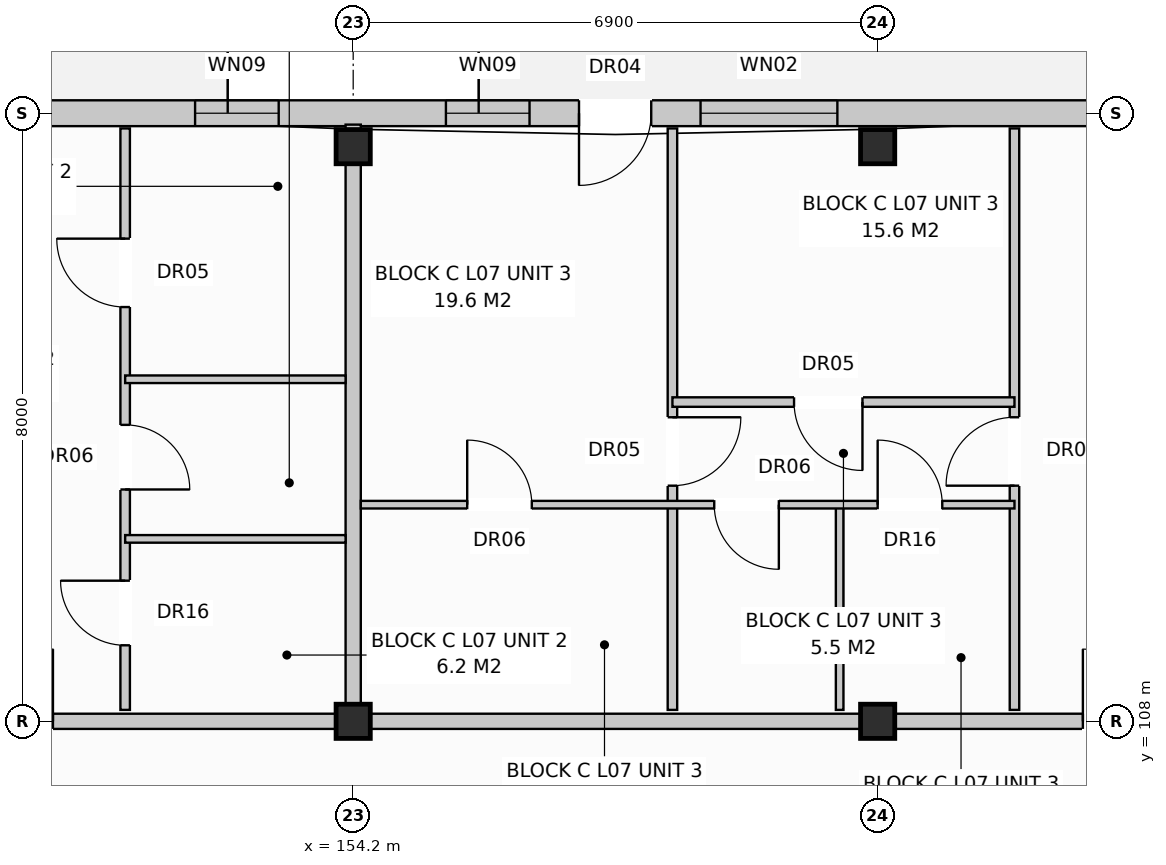
"""IFC4 building model, lengths in metres.
Left out: names, types, materials, properties, quantities, classifications, styles, units other than length and angle.
Written with IfcOpenShell. Run it as: python <this file> out.ifc"""

import sys

from ifc_helpers import new_model, si_unit, direction, frame, frame_2d, origin, origin_with_axes, origin_2d, place, context, subcontext, project, spatial, rectangle, extrude, element, fill, save


model = new_model("IFC4")
c1 = context("Model", 3, precision=1e-05, world=origin(), true_north=direction((0.0, 1.0)))
c2 = subcontext(c1, "Body", "Model", "MODEL_VIEW")
j1 = project(units=[si_unit("LENGTHUNIT", "METRE"), si_unit("PLANEANGLEUNIT", "RADIAN")], contexts=[c1])
p1 = place(None, origin())
s1 = spatial("IfcSite", under=j1, at=p1, CompositionType="ELEMENT")
p2 = place(p1, origin())
s2 = spatial("IfcBuilding", under=s1, at=p2, CompositionType="ELEMENT")
p3 = place(p2, frame((0.0, 0.0, 24.0)))
s3 = spatial("IfcBuildingStorey", under=s2, at=p3, CompositionType="ELEMENT", Elevation=24.0)
for number, where, z_axis, x_axis in (
    (1, (154.2, 108.0, 0.0), (0.0, 0.0, 1.0), (1.0, 0.0, 0.0)),
    (2, (154.2, 115.56, 0.0), (0.0, 0.0, 1.0), (1.0, 0.0, 0.0)),
    (3, (161.1, 108.0, 0.0), (0.0, 0.0, 1.0), (1.0, 0.0, 0.0)),
    (4, (161.1, 115.56, 0.0), (0.0, 0.0, 1.0), (1.0, 0.0, 0.0)),
):
    element("IfcColumn", number, at=place(p3, frame(where, z_axis=z_axis, x_axis=x_axis)), inside=s3, PredefinedType="COLUMN", context=c2, shape_type="SweptSolid", body=[
        extrude(rectangle(XDim=0.45, YDim=0.45, at=origin_2d()), origin(), (0.0, 0.0, 1.0), 3.2),
    ])
p4 = place(p3, frame((126.76, 116.0, 0.0), z_axis=(0.0, 0.0, 1.0), x_axis=(1.0, 0.0, 0.0)))
e5 = element("IfcWall", 5, at=p4, inside=s3, PredefinedType="STANDARD", context=c2, shape_type="SweptSolid", body=[
    extrude(rectangle(XDim=41.08, YDim=0.34, at=frame_2d((20.54, 0.0))), origin(), (0.0, 0.0, 1.0), 2.95),
])
p5 = place(p4, frame((4.911, 0.0, 0.0)))
e6 = element("IfcOpeningElement", 6, at=p5, cuts=e5, PredefinedType="OPENING", context=c2, shape_type="SweptSolid", body=[
    extrude(rectangle(XDim=0.95, YDim=2.1, at=frame_2d((0.475, 1.05))), frame((0.0, 0.182, 0.0), z_axis=(0.0, -1.0, 0.0), x_axis=(1.0, 0.0, 0.0)), (0.0, 0.0, 1.0), 0.364),
])
p6 = place(p4, frame((18.91, 0.0, 0.0)))
e7 = element("IfcOpeningElement", 7, at=p6, cuts=e5, PredefinedType="OPENING", context=c2, shape_type="SweptSolid", body=[
    extrude(rectangle(XDim=0.95, YDim=2.1, at=frame_2d((0.475, 1.05))), frame((0.0, 0.182, 0.0), z_axis=(0.0, -1.0, 0.0), x_axis=(1.0, 0.0, 0.0)), (0.0, 0.0, 1.0), 0.364),
])
p7 = place(p4, frame((30.411, 0.0, 0.0)))
e8 = element("IfcOpeningElement", 8, at=p7, cuts=e5, PredefinedType="OPENING", context=c2, shape_type="SweptSolid", body=[
    extrude(rectangle(XDim=0.95, YDim=2.1, at=frame_2d((0.475, 1.05))), frame((0.0, 0.182, 0.0), z_axis=(0.0, -1.0, 0.0), x_axis=(1.0, 0.0, 0.0)), (0.0, 0.0, 1.0), 0.364),
])
p8 = place(p4, frame((2.46, 0.0, 0.72)))
e9 = element("IfcOpeningElement", 9, at=p8, cuts=e5, PredefinedType="OPENING", context=c2, shape_type="SweptSolid", body=[
    extrude(rectangle(XDim=1.1, YDim=1.5, at=frame_2d((0.55, 0.75))), frame((0.0, 0.182, 0.0), z_axis=(0.0, -1.0, 0.0), x_axis=(1.0, 0.0, 0.0)), (0.0, 0.0, 1.0), 0.364),
])
p9 = place(p4, frame((7.81, 0.0, 0.8)))
e10 = element("IfcOpeningElement", 10, at=p9, cuts=e5, PredefinedType="OPENING", context=c2, shape_type="SweptSolid", body=[
    extrude(rectangle(XDim=1.8, YDim=1.7, at=frame_2d((0.9, 0.85))), frame((0.0, 0.182, 0.0), z_axis=(0.0, -1.0, 0.0), x_axis=(1.0, 0.0, 0.0)), (0.0, 0.0, 1.0), 0.364),
])
p10 = place(p4, frame((14.56, 0.0, 0.72)))
e11 = element("IfcOpeningElement", 11, at=p10, cuts=e5, PredefinedType="OPENING", context=c2, shape_type="SweptSolid", body=[
    extrude(rectangle(XDim=1.1, YDim=1.5, at=frame_2d((0.55, 0.75))), frame((0.0, 0.182, 0.0), z_axis=(0.0, -1.0, 0.0), x_axis=(1.0, 0.0, 0.0)), (0.0, 0.0, 1.0), 0.364),
])
p11 = place(p4, frame((16.76, 0.0, 0.8)))
e12 = element("IfcOpeningElement", 12, at=p11, cuts=e5, PredefinedType="OPENING", context=c2, shape_type="SweptSolid", body=[
    extrude(rectangle(XDim=1.9, YDim=1.85, at=frame_2d((0.95, 0.925))), frame((0.0, 0.182, 0.0), z_axis=(0.0, -1.0, 0.0), x_axis=(1.0, 0.0, 0.0)), (0.0, 0.0, 1.0), 0.364),
])
p12 = place(p4, frame((21.61, 0.0, 0.8)))
e13 = element("IfcOpeningElement", 13, at=p12, cuts=e5, PredefinedType="OPENING", context=c2, shape_type="SweptSolid", body=[
    extrude(rectangle(XDim=1.8, YDim=1.7, at=frame_2d((0.9, 0.85))), frame((0.0, 0.182, 0.0), z_axis=(0.0, -1.0, 0.0), x_axis=(1.0, 0.0, 0.0)), (0.0, 0.0, 1.0), 0.364),
])
p13 = place(p4, frame((25.36, 0.0, 0.72)))
e14 = element("IfcOpeningElement", 14, at=p13, cuts=e5, PredefinedType="OPENING", context=c2, shape_type="SweptSolid", body=[
    extrude(rectangle(XDim=1.1, YDim=1.5, at=frame_2d((0.55, 0.75))), frame((0.0, 0.182, 0.0), z_axis=(0.0, -1.0, 0.0), x_axis=(1.0, 0.0, 0.0)), (0.0, 0.0, 1.0), 0.364),
])
p14 = place(p4, frame((28.66, 0.0, 0.72)))
e15 = element("IfcOpeningElement", 15, at=p14, cuts=e5, PredefinedType="OPENING", context=c2, shape_type="SweptSolid", body=[
    extrude(rectangle(XDim=1.1, YDim=1.5, at=frame_2d((0.55, 0.75))), frame((0.0, 0.182, 0.0), z_axis=(0.0, -1.0, 0.0), x_axis=(1.0, 0.0, 0.0)), (0.0, 0.0, 1.0), 0.364),
])
p15 = place(p4, frame((32.01, 0.0, 0.8)))
e16 = element("IfcOpeningElement", 16, at=p15, cuts=e5, PredefinedType="OPENING", context=c2, shape_type="SweptSolid", body=[
    extrude(rectangle(XDim=1.8, YDim=1.7, at=frame_2d((0.9, 0.85))), frame((0.0, 0.182, 0.0), z_axis=(0.0, -1.0, 0.0), x_axis=(1.0, 0.0, 0.0)), (0.0, 0.0, 1.0), 0.364),
])
p16 = place(p4, frame((38.06, 0.0, 0.72)))
e17 = element("IfcOpeningElement", 17, at=p16, cuts=e5, PredefinedType="OPENING", context=c2, shape_type="SweptSolid", body=[
    extrude(rectangle(XDim=1.1, YDim=1.5, at=frame_2d((0.55, 0.75))), frame((0.0, 0.182, 0.0), z_axis=(0.0, -1.0, 0.0), x_axis=(1.0, 0.0, 0.0)), (0.0, 0.0, 1.0), 0.364),
])
p17 = place(p3, frame((154.2, 108.15, 0.0), z_axis=(0.0, 0.0, 1.0), x_axis=(0.0, 1.0, 0.0)))
e18 = element("IfcWall", 18, at=p17, inside=s3, PredefinedType="PARTITIONING", context=c2, shape_type="SweptSolid", body=[
    extrude(rectangle(XDim=7.7, YDim=0.2, at=frame_2d((3.85, 0.0))), origin(), (0.0, 0.0, 1.0), 2.95),
])
p18 = place(p3, frame((147.3, 108.0, 0.0), z_axis=(0.0, 0.0, 1.0), x_axis=(1.0, 0.0, 0.0)))
e19 = element("IfcWall", 19, at=p18, inside=s3, PredefinedType="PARTITIONING", context=c2, shape_type="SweptSolid", body=[
    extrude(rectangle(XDim=6.9, YDim=0.2, at=frame_2d((3.45, 0.0))), origin(), (0.0, 0.0, 1.0), 2.39),
])
p19 = place(p18, frame((2.0, 0.0, 0.0)))
e20 = element("IfcOpeningElement", 20, at=p19, cuts=e19, PredefinedType="OPENING", context=c2, shape_type="SweptSolid", body=[
    extrude(rectangle(XDim=0.95, YDim=2.15, at=frame_2d((0.475, 1.075))), frame((0.0, 0.112, 0.0), z_axis=(0.0, -1.0, 0.0), x_axis=(1.0, 0.0, 0.0)), (0.0, 0.0, 1.0), 0.224),
])
p20 = place(p3, frame((151.2, 108.15, 0.0), z_axis=(0.0, 0.0, 1.0), x_axis=(0.0, 1.0, 0.0)))
e21 = element("IfcWall", 21, at=p20, inside=s3, PredefinedType="PARTITIONING", context=c2, shape_type="SweptSolid", body=[
    extrude(rectangle(XDim=7.65, YDim=0.125, at=frame_2d((3.825, 0.0))), origin(), (0.0, 0.0, 1.0), 2.95),
])
p21 = place(p20, frame((0.85, 0.0, 0.0)))
e22 = element("IfcOpeningElement", 22, at=p21, cuts=e21, PredefinedType="OPENING", context=c2, shape_type="SweptSolid", body=[
    extrude(rectangle(XDim=0.85, YDim=2.1, at=frame_2d((0.425, 1.05))), frame((0.0, 0.074, 0.0), z_axis=(0.0, -1.0, 0.0), x_axis=(1.0, 0.0, 0.0)), (0.0, 0.0, 1.0), 0.149),
])
p22 = place(p20, frame((2.9, 0.0, 0.0)))
e23 = element("IfcOpeningElement", 23, at=p22, cuts=e21, PredefinedType="OPENING", context=c2, shape_type="SweptSolid", body=[
    extrude(rectangle(XDim=0.85, YDim=2.05, at=frame_2d((0.425, 1.025))), frame((0.0, 0.074, 0.0), z_axis=(0.0, -1.0, 0.0), x_axis=(1.0, 0.0, 0.0)), (0.0, 0.0, 1.0), 0.149),
])
p23 = place(p20, frame((5.3, 0.0, 0.0)))
e24 = element("IfcOpeningElement", 24, at=p23, cuts=e21, PredefinedType="OPENING", context=c2, shape_type="SweptSolid", body=[
    extrude(rectangle(XDim=0.9, YDim=2.1, at=frame_2d((0.45, 1.05))), frame((0.0, 0.074, 0.0), z_axis=(0.0, -1.0, 0.0), x_axis=(1.0, 0.0, 0.0)), (0.0, 0.0, 1.0), 0.149),
])
for number, where, z_axis, x_axis in (
    (25, (151.2, 110.4, 0.0), (0.0, 0.0, 1.0), (1.0, 0.0, 0.0)),
    (26, (151.2, 112.5, 0.0), (0.0, 0.0, 1.0), (1.0, 0.0, 0.0)),
):
    element("IfcWall", number, at=place(p3, frame(where, z_axis=z_axis, x_axis=x_axis)), inside=s3, PredefinedType="PARTITIONING", context=c2, shape_type="SweptSolid", body=[
        extrude(rectangle(XDim=2.9, YDim=0.1, at=frame_2d((1.45, 0.0))), origin(), (0.0, 0.0, 1.0), 2.95),
    ])
p24 = place(p3, frame((154.2, 108.0, 0.0), z_axis=(0.0, 0.0, 1.0), x_axis=(1.0, 0.0, 0.0)))
e27 = element("IfcWall", 27, at=p24, inside=s3, PredefinedType="PARTITIONING", context=c2, shape_type="SweptSolid", body=[
    extrude(rectangle(XDim=13.8, YDim=0.2, at=frame_2d((6.9, 0.0))), origin(), (0.0, 0.0, 1.0), 2.39),
])
p25 = place(p24, frame((9.6, 0.0, 0.0)))
e28 = element("IfcOpeningElement", 28, at=p25, cuts=e27, PredefinedType="OPENING", context=c2, shape_type="SweptSolid", body=[
    extrude(rectangle(XDim=0.95, YDim=2.15, at=frame_2d((0.475, 1.075))), frame((0.0, 0.112, 0.0), z_axis=(0.0, -1.0, 0.0), x_axis=(1.0, 0.0, 0.0)), (0.0, 0.0, 1.0), 0.224),
])
p26 = place(p3, frame((162.9, 108.15, 0.0), z_axis=(0.0, 0.0, 1.0), x_axis=(0.0, 1.0, 0.0)))
e29 = element("IfcWall", 29, at=p26, inside=s3, PredefinedType="PARTITIONING", context=c2, shape_type="SweptSolid", body=[
    extrude(rectangle(XDim=7.65, YDim=0.125, at=frame_2d((3.825, 0.0))), origin(), (0.0, 0.0, 1.0), 2.95),
])
p27 = place(p26, frame((2.95, 0.0, 0.0)))
e30 = element("IfcOpeningElement", 30, at=p27, cuts=e29, PredefinedType="OPENING", context=c2, shape_type="SweptSolid", body=[
    extrude(rectangle(XDim=0.9, YDim=2.1, at=frame_2d((0.45, 1.05))), frame((0.0, 0.074, 0.0), z_axis=(0.0, -1.0, 0.0), x_axis=(1.0, 0.0, 0.0)), (0.0, 0.0, 1.0), 0.149),
])
p28 = place(p3, frame((158.4, 108.15, 0.0), z_axis=(0.0, 0.0, 1.0), x_axis=(0.0, 1.0, 0.0)))
e31 = element("IfcWall", 31, at=p28, inside=s3, PredefinedType="PARTITIONING", context=c2, shape_type="SweptSolid", body=[
    extrude(rectangle(XDim=7.65, YDim=0.125, at=frame_2d((3.825, 0.0))), origin(), (0.0, 0.0, 1.0), 2.95),
])
p29 = place(p28, frame((2.95, 0.0, 0.0)))
e32 = element("IfcOpeningElement", 32, at=p29, cuts=e31, PredefinedType="OPENING", context=c2, shape_type="SweptSolid", body=[
    extrude(rectangle(XDim=0.9, YDim=2.1, at=frame_2d((0.45, 1.05))), frame((0.0, 0.074, 0.0), z_axis=(0.0, -1.0, 0.0), x_axis=(1.0, 0.0, 0.0)), (0.0, 0.0, 1.0), 0.149),
])
p30 = place(p3, frame((160.6, 108.15, 0.0), z_axis=(0.0, 0.0, 1.0), x_axis=(0.0, 1.0, 0.0)))
e33 = element("IfcWall", 33, at=p30, inside=s3, PredefinedType="PARTITIONING", context=c2, shape_type="SweptSolid", body=[
    extrude(rectangle(XDim=2.7, YDim=0.1, at=frame_2d((1.35, 0.0))), origin(), (0.0, 0.0, 1.0), 2.95),
])
p31 = place(p3, frame((154.3, 110.85, 0.0), z_axis=(0.0, 0.0, 1.0), x_axis=(1.0, 0.0, 0.0)))
e34 = element("IfcWall", 34, at=p31, inside=s3, PredefinedType="PARTITIONING", context=c2, shape_type="SweptSolid", body=[
    extrude(rectangle(XDim=8.6, YDim=0.1, at=frame_2d((4.3, 0.0))), origin(), (0.0, 0.0, 1.0), 2.95),
])
p32 = place(p31, frame((1.4, 0.0, 0.0)))
e35 = element("IfcOpeningElement", 35, at=p32, cuts=e34, PredefinedType="OPENING", context=c2, shape_type="SweptSolid", body=[
    extrude(rectangle(XDim=0.85, YDim=2.05, at=frame_2d((0.425, 1.025))), frame((0.0, 0.062, 0.0), z_axis=(0.0, -1.0, 0.0), x_axis=(1.0, 0.0, 0.0)), (0.0, 0.0, 1.0), 0.124),
])
p33 = place(p31, frame((4.65, 0.0, 0.0)))
e36 = element("IfcOpeningElement", 36, at=p33, cuts=e34, PredefinedType="OPENING", context=c2, shape_type="SweptSolid", body=[
    extrude(rectangle(XDim=0.85, YDim=2.05, at=frame_2d((0.425, 1.025))), frame((0.0, 0.062, 0.0), z_axis=(0.0, -1.0, 0.0), x_axis=(1.0, 0.0, 0.0)), (0.0, 0.0, 1.0), 0.124),
])
p34 = place(p31, frame((6.8, 0.0, 0.0)))
e37 = element("IfcOpeningElement", 37, at=p34, cuts=e34, PredefinedType="OPENING", context=c2, shape_type="SweptSolid", body=[
    extrude(rectangle(XDim=0.85, YDim=2.1, at=frame_2d((0.425, 1.05))), frame((0.0, 0.062, 0.0), z_axis=(0.0, -1.0, 0.0), x_axis=(1.0, 0.0, 0.0)), (0.0, 0.0, 1.0), 0.124),
])
p35 = place(p3, frame((158.4, 112.2, 0.0), z_axis=(0.0, 0.0, 1.0), x_axis=(1.0, 0.0, 0.0)))
e38 = element("IfcWall", 38, at=p35, inside=s3, PredefinedType="PARTITIONING", context=c2, shape_type="SweptSolid", body=[
    extrude(rectangle(XDim=4.5, YDim=0.125, at=frame_2d((2.25, 0.0))), origin(), (0.0, 0.0, 1.0), 2.95),
])
p36 = place(p35, frame((1.6, 0.0, 0.0)))
e39 = element("IfcOpeningElement", 39, at=p36, cuts=e38, PredefinedType="OPENING", context=c2, shape_type="SweptSolid", body=[
    extrude(rectangle(XDim=0.9, YDim=2.1, at=frame_2d((0.45, 1.05))), frame((0.0, 0.074, 0.0), z_axis=(0.0, -1.0, 0.0), x_axis=(1.0, 0.0, 0.0)), (0.0, 0.0, 1.0), 0.149),
])
p37 = place(p7, frame((0.95, 0.0, 0.0), z_axis=(0.0, 0.0, 1.0), x_axis=(-1.0, 0.0, 0.0)))
e40 = element("IfcDoor", 40, at=p37, inside=s3, OperationType="SINGLE_SWING_LEFT", PredefinedType="DOOR", context=c2, shape_type="SweptSolid", body=[
    extrude(rectangle(XDim=0.95, YDim=2.1, at=frame_2d((0.475, 1.05))), frame((0.0, 0.025, 0.0), z_axis=(0.0, -1.0, 0.0), x_axis=(1.0, 0.0, 0.0)), (0.0, 0.0, 1.0), 0.05),
])
fill(e8, e40)
p38 = place(p13, origin_with_axes())
e41 = element("IfcWindow", 41, at=p38, inside=s3, PartitioningType="SINGLE_PANEL", PredefinedType="WINDOW", context=c2, shape_type="SweptSolid", body=[
    extrude(rectangle(XDim=1.1, YDim=1.5, at=frame_2d((0.55, 0.75))), frame((0.0, 0.03, 0.0), z_axis=(0.0, -1.0, 0.0), x_axis=(1.0, 0.0, 0.0)), (0.0, 0.0, 1.0), 0.06),
])
fill(e14, e41)
p39 = place(p14, origin_with_axes())
e42 = element("IfcWindow", 42, at=p39, inside=s3, PartitioningType="SINGLE_PANEL", PredefinedType="WINDOW", context=c2, shape_type="SweptSolid", body=[
    extrude(rectangle(XDim=1.1, YDim=1.5, at=frame_2d((0.55, 0.75))), frame((0.0, 0.03, 0.0), z_axis=(0.0, -1.0, 0.0), x_axis=(1.0, 0.0, 0.0)), (0.0, 0.0, 1.0), 0.06),
])
fill(e15, e42)
p40 = place(p15, origin_with_axes())
e43 = element("IfcWindow", 43, at=p40, inside=s3, PartitioningType="SINGLE_PANEL", PredefinedType="WINDOW", context=c2, shape_type="SweptSolid", body=[
    extrude(rectangle(XDim=1.8, YDim=1.7, at=frame_2d((0.9, 0.85))), frame((0.0, 0.03, 0.0), z_axis=(0.0, -1.0, 0.0), x_axis=(1.0, 0.0, 0.0)), (0.0, 0.0, 1.0), 0.06),
])
fill(e16, e43)
p41 = place(p19, origin_with_axes())
e44 = element("IfcDoor", 44, at=p41, inside=s3, OperationType="SINGLE_SWING_RIGHT", PredefinedType="DOOR", context=c2, shape_type="SweptSolid", body=[
    extrude(rectangle(XDim=0.95, YDim=2.15, at=frame_2d((0.475, 1.075))), frame((0.0, 0.025, 0.0), z_axis=(0.0, -1.0, 0.0), x_axis=(1.0, 0.0, 0.0)), (0.0, 0.0, 1.0), 0.05),
])
fill(e20, e44)
p42 = place(p21, origin_with_axes())
e45 = element("IfcDoor", 45, at=p42, inside=s3, OperationType="SINGLE_SWING_RIGHT", PredefinedType="DOOR", context=c2, shape_type="SweptSolid", body=[
    extrude(rectangle(XDim=0.85, YDim=2.1, at=frame_2d((0.425, 1.05))), frame((0.0, 0.025, 0.0), z_axis=(0.0, -1.0, 0.0), x_axis=(1.0, 0.0, 0.0)), (0.0, 0.0, 1.0), 0.05),
])
fill(e22, e45)
p43 = place(p22, frame((0.85, 0.0, 0.0), z_axis=(0.0, 0.0, 1.0), x_axis=(-1.0, 0.0, 0.0)))
e46 = element("IfcDoor", 46, at=p43, inside=s3, OperationType="SINGLE_SWING_LEFT", PredefinedType="DOOR", context=c2, shape_type="SweptSolid", body=[
    extrude(rectangle(XDim=0.85, YDim=2.05, at=frame_2d((0.425, 1.025))), frame((0.0, 0.025, 0.0), z_axis=(0.0, -1.0, 0.0), x_axis=(1.0, 0.0, 0.0)), (0.0, 0.0, 1.0), 0.05),
])
fill(e23, e46)
p44 = place(p23, origin_with_axes())
e47 = element("IfcDoor", 47, at=p44, inside=s3, OperationType="SINGLE_SWING_RIGHT", PredefinedType="DOOR", context=c2, shape_type="SweptSolid", body=[
    extrude(rectangle(XDim=0.9, YDim=2.1, at=frame_2d((0.45, 1.05))), frame((0.0, 0.025, 0.0), z_axis=(0.0, -1.0, 0.0), x_axis=(1.0, 0.0, 0.0)), (0.0, 0.0, 1.0), 0.05),
])
fill(e24, e47)
p45 = place(p25, origin_with_axes())
e48 = element("IfcDoor", 48, at=p45, inside=s3, OperationType="SINGLE_SWING_LEFT", PredefinedType="DOOR", context=c2, shape_type="SweptSolid", body=[
    extrude(rectangle(XDim=0.95, YDim=2.15, at=frame_2d((0.475, 1.075))), frame((0.0, 0.025, 0.0), z_axis=(0.0, -1.0, 0.0), x_axis=(1.0, 0.0, 0.0)), (0.0, 0.0, 1.0), 0.05),
])
fill(e28, e48)
p46 = place(p27, origin_with_axes())
e49 = element("IfcDoor", 49, at=p46, inside=s3, OperationType="SINGLE_SWING_LEFT", PredefinedType="DOOR", context=c2, shape_type="SweptSolid", body=[
    extrude(rectangle(XDim=0.9, YDim=2.1, at=frame_2d((0.45, 1.05))), frame((0.0, 0.025, 0.0), z_axis=(0.0, -1.0, 0.0), x_axis=(1.0, 0.0, 0.0)), (0.0, 0.0, 1.0), 0.05),
])
fill(e30, e49)
p47 = place(p29, frame((0.9, 0.0, 0.0), z_axis=(0.0, 0.0, 1.0), x_axis=(-1.0, 0.0, 0.0)))
e50 = element("IfcDoor", 50, at=p47, inside=s3, OperationType="SINGLE_SWING_RIGHT", PredefinedType="DOOR", context=c2, shape_type="SweptSolid", body=[
    extrude(rectangle(XDim=0.9, YDim=2.1, at=frame_2d((0.45, 1.05))), frame((0.0, 0.025, 0.0), z_axis=(0.0, -1.0, 0.0), x_axis=(1.0, 0.0, 0.0)), (0.0, 0.0, 1.0), 0.05),
])
fill(e32, e50)
p48 = place(p32, origin_with_axes())
e51 = element("IfcDoor", 51, at=p48, inside=s3, OperationType="SINGLE_SWING_LEFT", PredefinedType="DOOR", context=c2, shape_type="SweptSolid", body=[
    extrude(rectangle(XDim=0.85, YDim=2.05, at=frame_2d((0.425, 1.025))), frame((0.0, 0.025, 0.0), z_axis=(0.0, -1.0, 0.0), x_axis=(1.0, 0.0, 0.0)), (0.0, 0.0, 1.0), 0.05),
])
fill(e35, e51)
p49 = place(p33, frame((0.85, 0.0, 0.0), z_axis=(0.0, 0.0, 1.0), x_axis=(-1.0, 0.0, 0.0)))
e52 = element("IfcDoor", 52, at=p49, inside=s3, OperationType="SINGLE_SWING_RIGHT", PredefinedType="DOOR", context=c2, shape_type="SweptSolid", body=[
    extrude(rectangle(XDim=0.85, YDim=2.05, at=frame_2d((0.425, 1.025))), frame((0.0, 0.025, 0.0), z_axis=(0.0, -1.0, 0.0), x_axis=(1.0, 0.0, 0.0)), (0.0, 0.0, 1.0), 0.05),
])
fill(e36, e52)
p50 = place(p34, origin_with_axes())
e53 = element("IfcDoor", 53, at=p50, inside=s3, OperationType="SINGLE_SWING_LEFT", PredefinedType="DOOR", context=c2, shape_type="SweptSolid", body=[
    extrude(rectangle(XDim=0.85, YDim=2.1, at=frame_2d((0.425, 1.05))), frame((0.0, 0.025, 0.0), z_axis=(0.0, -1.0, 0.0), x_axis=(1.0, 0.0, 0.0)), (0.0, 0.0, 1.0), 0.05),
])
fill(e37, e53)
p51 = place(p36, frame((0.9, 0.0, 0.0), z_axis=(0.0, 0.0, 1.0), x_axis=(-1.0, 0.0, 0.0)))
e54 = element("IfcDoor", 54, at=p51, inside=s3, OperationType="SINGLE_SWING_RIGHT", PredefinedType="DOOR", context=c2, shape_type="SweptSolid", body=[
    extrude(rectangle(XDim=0.9, YDim=2.1, at=frame_2d((0.45, 1.05))), frame((0.0, 0.025, 0.0), z_axis=(0.0, -1.0, 0.0), x_axis=(1.0, 0.0, 0.0)), (0.0, 0.0, 1.0), 0.05),
])
fill(e39, e54)
save(model, sys.argv[1])
